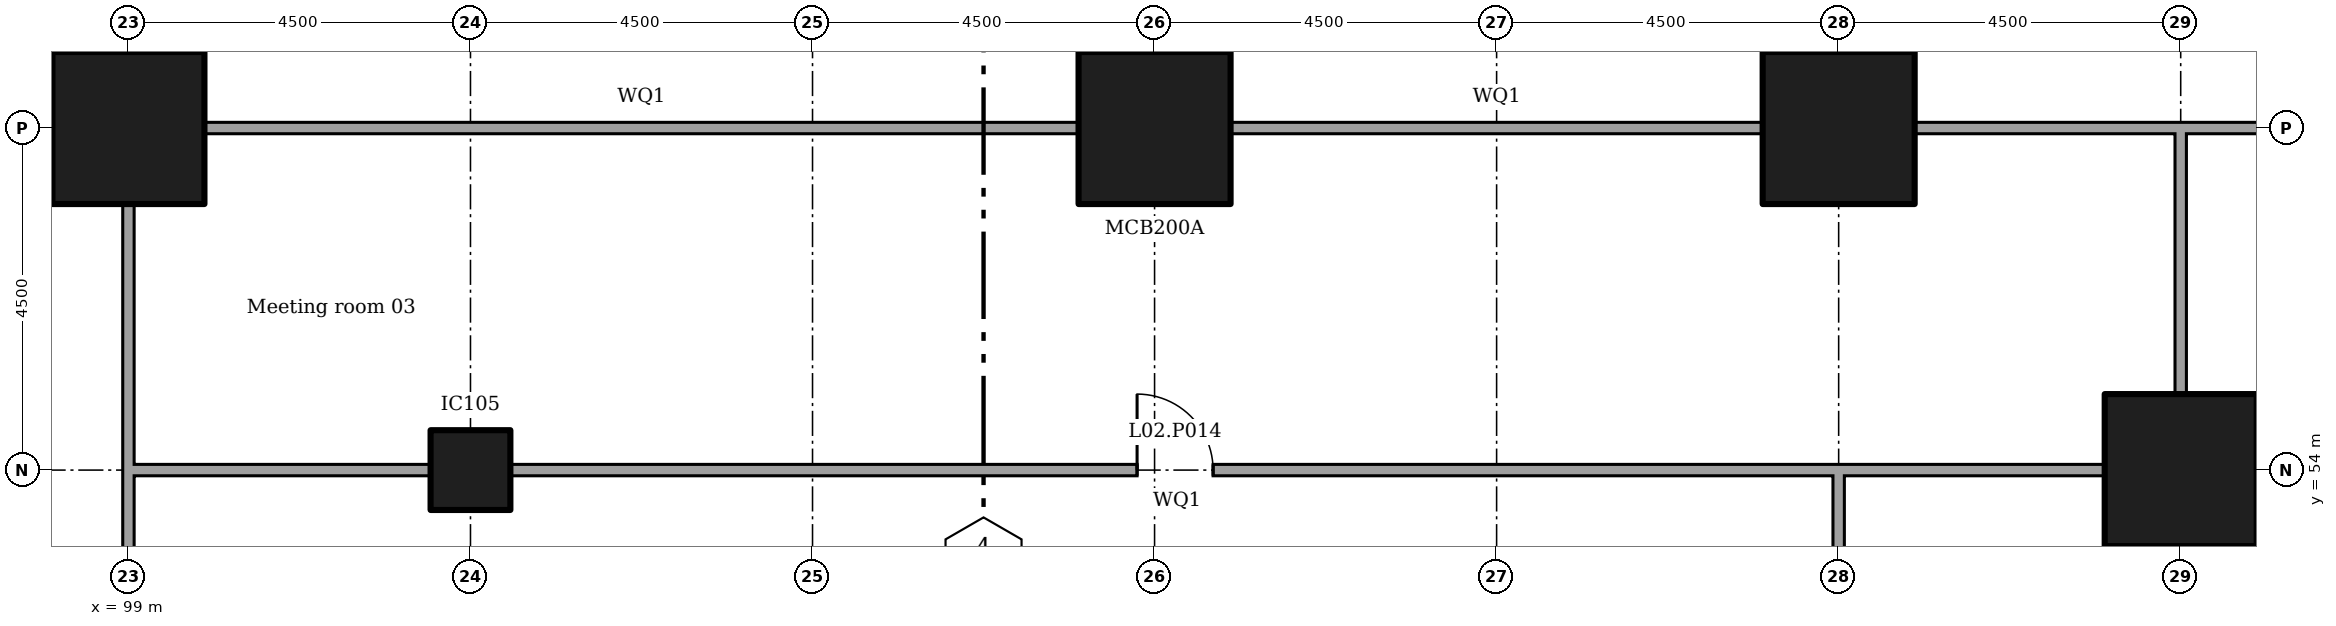
"""IFC4 building model, lengths in metres.
Left out: names, types, materials, properties, quantities, classifications, styles, units other than length and angle.
Written with IfcOpenShell. Run it as: python <this file> out.ifc"""

import sys

from ifc_helpers import new_model, si_unit, direction, frame, frame_2d, origin, origin_2d, place, context, subcontext, project, spatial, rectangle, extrude, element, fill, save


model = new_model("IFC4")
c1 = context("Model", 3, precision=1e-05, world=origin(), true_north=direction((0.0, 1.0)))
c2 = subcontext(c1, "Body", "Model", "MODEL_VIEW")
j1 = project(units=[si_unit("LENGTHUNIT", "METRE"), si_unit("PLANEANGLEUNIT", "RADIAN")], contexts=[c1])
p1 = place(None, origin())
s1 = spatial("IfcSite", under=j1, at=p1, CompositionType="ELEMENT")
p2 = place(p1, origin())
s2 = spatial("IfcBuilding", under=s1, at=p2, CompositionType="ELEMENT")
p3 = place(p2, frame((0.0, 0.0, 11.5)))
s3 = spatial("IfcBuildingStorey", under=s2, at=p3, CompositionType="ELEMENT", Elevation=11.5)
for number, where in (
    (1, (99.0, 58.5, 0.0)),
    (2, (112.5, 58.5, 0.0)),
    (3, (121.5, 58.5, 0.0)),
    (4, (126.0, 54.0, 0.0)),
):
    element("IfcColumn", number, at=place(p3, frame(where)), inside=s3, PredefinedType="COLUMN", context=c2, shape_type="SweptSolid", body=[
        extrude(rectangle(XDim=2.0, YDim=2.0, at=origin_2d()), origin(), (0.0, 0.0, 1.0), 5.0),
    ])
p4 = place(p3, frame((103.5, 54.0, 0.0)))
e5 = element("IfcColumn", 5, at=p4, inside=s3, PredefinedType="COLUMN", context=c2, shape_type="SweptSolid", body=[
    extrude(rectangle(XDim=1.05, YDim=1.05, at=origin_2d()), origin(), (0.0, 0.0, 1.0), 5.0),
])
p5 = place(p3, frame((99.0, 36.52, 0.0), z_axis=(0.0, 0.0, 1.0), x_axis=(0.0, 1.0, 0.0)))
e6 = element("IfcWall", 6, at=p5, inside=s3, PredefinedType="PARTITIONING", context=c2, shape_type="SweptSolid", body=[
    extrude(rectangle(XDim=17.555, YDim=0.15, at=frame_2d((8.777, 0.0))), origin(), (0.0, 0.0, 1.0), 4.55),
])
p6 = place(p5, frame((7.85, 0.0, 0.0)))
e7 = element("IfcOpeningElement", 7, at=p6, cuts=e6, PredefinedType="OPENING", context=c2, shape_type="SweptSolid", body=[
    extrude(rectangle(XDim=1.8, YDim=2.1, at=frame_2d((0.9, 1.05))), frame((0.0, 0.085, 0.0), z_axis=(0.0, -1.0, 0.0), x_axis=(1.0, 0.0, 0.0)), (0.0, 0.0, 1.0), 0.17),
])
p7 = place(p3, frame((99.0, 54.0, 0.0), z_axis=(0.0, 0.0, 1.0), x_axis=(0.0, 1.0, 0.0)))
e8 = element("IfcWall", 8, at=p7, inside=s3, PredefinedType="PARTITIONING", context=c2, shape_type="SweptSolid", body=[
    extrude(rectangle(XDim=3.505, YDim=0.15, at=frame_2d((1.752, 0.0))), origin(), (0.0, 0.0, 1.0), 4.55),
])
p8 = place(p3, frame((94.65, 58.5, 0.0)))
e9 = element("IfcWall", 9, at=p8, inside=s3, PredefinedType="PARTITIONING", context=c2, shape_type="SweptSolid", body=[
    extrude(rectangle(XDim=3.355, YDim=0.15, at=frame_2d((1.677, 0.0))), origin(), (0.0, 0.0, 1.0), 4.55),
])
p9 = place(p8, frame((1.0, 0.0, 0.0)))
e10 = element("IfcOpeningElement", 10, at=p9, cuts=e9, PredefinedType="OPENING", context=c2, shape_type="SweptSolid", body=[
    extrude(rectangle(XDim=1.2, YDim=2.1, at=frame_2d((0.6, 1.05))), frame((0.0, 0.085, 0.0), z_axis=(0.0, -1.0, 0.0), x_axis=(1.0, 0.0, 0.0)), (0.0, 0.0, 1.0), 0.17),
])
p10 = place(p3, frame((99.075, 54.0, 0.0)))
e11 = element("IfcWall", 11, at=p10, inside=s3, PredefinedType="PARTITIONING", context=c2, shape_type="SweptSolid", body=[
    extrude(rectangle(XDim=3.905, YDim=0.15, at=frame_2d((1.953, 0.0))), origin(), (0.0, 0.0, 1.0), 4.55),
])
p11 = place(p3, frame((104.02, 54.0, 0.0)))
e12 = element("IfcWall", 12, at=p11, inside=s3, PredefinedType="PARTITIONING", context=c2, shape_type="SweptSolid", body=[
    extrude(rectangle(XDim=17.555, YDim=0.15, at=frame_2d((8.777, 0.0))), origin(), (0.0, 0.0, 1.0), 4.55),
])
p12 = place(p11, frame((8.25, 0.0, 0.0)))
e13 = element("IfcOpeningElement", 13, at=p12, cuts=e12, PredefinedType="OPENING", context=c2, shape_type="SweptSolid", body=[
    extrude(rectangle(XDim=1.0, YDim=2.1, at=frame_2d((0.5, 1.05))), frame((0.0, 0.085, 0.0), z_axis=(0.0, -1.0, 0.0), x_axis=(1.0, 0.0, 0.0)), (0.0, 0.0, 1.0), 0.17),
])
p13 = place(p3, frame((121.5, 50.02, 0.0), z_axis=(0.0, 0.0, 1.0), x_axis=(0.0, 1.0, 0.0)))
e14 = element("IfcWall", 14, at=p13, inside=s3, PredefinedType="PARTITIONING", context=c2, shape_type="SweptSolid", body=[
    extrude(rectangle(XDim=3.905, YDim=0.15, at=frame_2d((1.953, 0.0))), origin(), (0.0, 0.0, 1.0), 4.55),
])
p14 = place(p3, frame((121.5, 54.0, 0.0)))
e15 = element("IfcWall", 15, at=p14, inside=s3, PredefinedType="PARTITIONING", context=c2, shape_type="SweptSolid", body=[
    extrude(rectangle(XDim=3.505, YDim=0.15, at=frame_2d((1.752, 0.0))), origin(), (0.0, 0.0, 1.0), 4.55),
])
p15 = place(p3, frame((126.0, 54.995, 0.0), z_axis=(0.0, 0.0, 1.0), x_axis=(0.0, 1.0, 0.0)))
e16 = element("IfcWall", 16, at=p15, inside=s3, PredefinedType="PARTITIONING", context=c2, shape_type="SweptSolid", body=[
    extrude(rectangle(XDim=3.58, YDim=0.15, at=frame_2d((1.79, 0.0))), origin(), (0.0, 0.0, 1.0), 4.55),
])
p16 = place(p3, frame((99.995, 58.5, 0.0)))
e17 = element("IfcWall", 17, at=p16, inside=s3, PredefinedType="PARTITIONING", context=c2, shape_type="SweptSolid", body=[
    extrude(rectangle(XDim=11.51, YDim=0.15, at=frame_2d((5.755, 0.0))), origin(), (0.0, 0.0, 1.0), 4.55),
])
p17 = place(p3, frame((113.495, 58.5, 0.0)))
e18 = element("IfcWall", 18, at=p17, inside=s3, PredefinedType="PARTITIONING", context=c2, shape_type="SweptSolid", body=[
    extrude(rectangle(XDim=7.01, YDim=0.15, at=frame_2d((3.505, 0.0))), origin(), (0.0, 0.0, 1.0), 4.55),
])
p18 = place(p3, frame((122.495, 58.5, 0.0)))
e19 = element("IfcWall", 19, at=p18, inside=s3, PredefinedType="PARTITIONING", context=c2, shape_type="SweptSolid", body=[
    extrude(rectangle(XDim=3.505, YDim=0.15, at=frame_2d((1.752, 0.0))), origin(), (0.0, 0.0, 1.0), 4.55),
])
p19 = place(p3, frame((126.0, 45.995, 0.0), z_axis=(0.0, 0.0, 1.0), x_axis=(0.0, 1.0, 0.0)))
e20 = element("IfcWall", 20, at=p19, inside=s3, PredefinedType="PARTITIONING", context=c2, shape_type="SweptSolid", body=[
    extrude(rectangle(XDim=7.01, YDim=0.15, at=frame_2d((3.505, 0.0))), origin(), (0.0, 0.0, 1.0), 4.55),
])
p20 = place(p3, frame((126.075, 58.5, 0.0)))
e21 = element("IfcWall", 21, at=p20, inside=s3, PredefinedType="PARTITIONING", context=c2, shape_type="SweptSolid", body=[
    extrude(rectangle(XDim=4.35, YDim=0.15, at=frame_2d((2.175, 0.0))), origin(), (0.0, 0.0, 1.0), 4.55),
])
p21 = place(p3, frame((112.5, 59.495, 0.0), z_axis=(0.0, 0.0, 1.0), x_axis=(0.0, 1.0, 0.0)))
e22 = element("IfcWall", 22, at=p21, inside=s3, PredefinedType="PARTITIONING", context=c2, shape_type="SweptSolid", body=[
    extrude(rectangle(XDim=12.43, YDim=0.15, at=frame_2d((6.215, 0.0))), origin(), (0.0, 0.0, 1.0), 4.55),
])
p22 = place(p21, frame((5.35, 0.0, 0.0)))
e23 = element("IfcOpeningElement", 23, at=p22, cuts=e22, PredefinedType="OPENING", context=c2, shape_type="SweptSolid", body=[
    extrude(rectangle(XDim=1.8, YDim=2.1, at=frame_2d((0.9, 1.05))), frame((0.0, 0.085, 0.0), z_axis=(0.0, -1.0, 0.0), x_axis=(1.0, 0.0, 0.0)), (0.0, 0.0, 1.0), 0.17),
])
p23 = place(p12, origin())
e24 = element("IfcDoor", 24, at=p23, inside=s3, OperationType="SINGLE_SWING_RIGHT", PredefinedType="DOOR", context=c2, shape_type="SweptSolid", body=[
    extrude(rectangle(XDim=1.0, YDim=2.1, at=frame_2d((0.5, 1.05))), frame((0.0, 0.025, 0.0), z_axis=(0.0, -1.0, 0.0), x_axis=(1.0, 0.0, 0.0)), (0.0, 0.0, 1.0), 0.05),
])
fill(e13, e24)
save(model, sys.argv[1])
